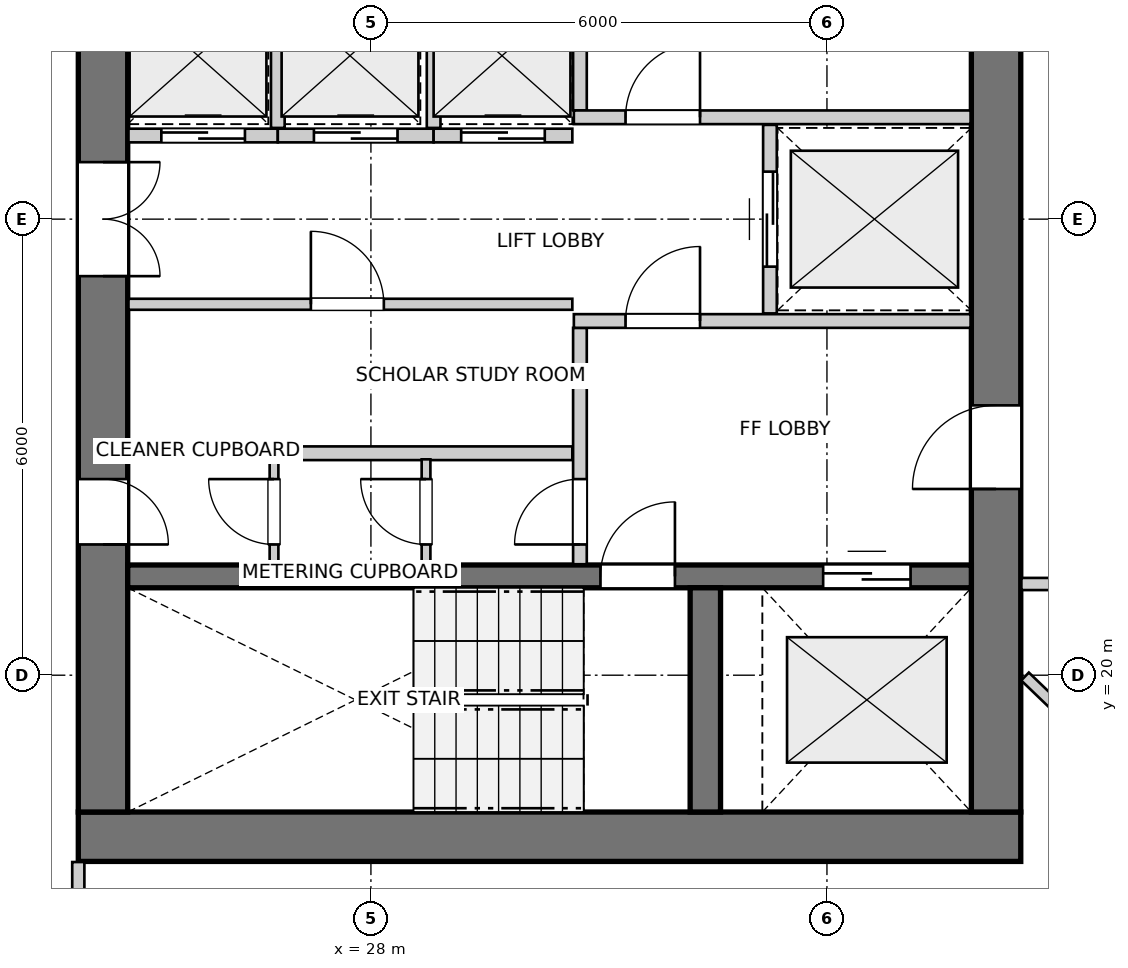
"""IFC4 building model, lengths in metres.
Left out: names, types, materials, properties, quantities, classifications, styles, units other than length and angle.
Written with IfcOpenShell. Run it as: python <this file> out.ifc"""

import sys

from ifc_helpers import new_model, si_unit, direction, frame, frame_2d, origin, place, context, subcontext, project, spatial, rectangle, extrude, source, transform, mapped, element, fill, save


model = new_model("IFC4")
c1 = context("Model", 3, precision=1e-05, world=origin(), true_north=direction((0.0, 1.0)))
c2 = subcontext(c1, "Body", "Model", "MODEL_VIEW")
j1 = project(units=[si_unit("LENGTHUNIT", "METRE"), si_unit("PLANEANGLEUNIT", "RADIAN")], contexts=[c1])
p1 = place(None, origin())
s1 = spatial("IfcSite", under=j1, at=p1, CompositionType="ELEMENT")
p2 = place(p1, origin())
s2 = spatial("IfcBuilding", under=s1, at=p2, CompositionType="ELEMENT")
p3 = place(p2, frame((0.0, 0.0, 155.4)))
s3 = spatial("IfcBuildingStorey", under=s2, at=p3, CompositionType="ELEMENT", Elevation=155.4)
p4 = place(p3, frame((24.15, 17.875, 0.0), z_axis=(0.0, 0.0, 1.0), x_axis=(1.0, 0.0, 0.0)))
e1 = element("IfcWall", 1, at=p4, inside=s3, PredefinedType="SHEAR", context=c2, shape_type="SweptSolid", body=[
    extrude(rectangle(XDim=12.4, YDim=0.65, at=frame_2d((6.2, 0.0))), origin(), (0.0, 0.0, 1.0), 2.935),
])
p5 = place(p3, frame((24.475, 33.8, 0.0), z_axis=(0.0, 0.0, 1.0), x_axis=(0.0, -1.0, 0.0)))
e2 = element("IfcWall", 2, at=p5, inside=s3, PredefinedType="SHEAR", context=c2, shape_type="SweptSolid", body=[
    extrude(rectangle(XDim=15.6, YDim=0.65, at=frame_2d((7.8, 0.0))), origin(), (0.0, 0.0, 1.0), 2.935),
])
p6 = place(p5, frame((7.05, 0.0, 0.0)))
e3 = element("IfcOpeningElement", 3, at=p6, cuts=e2, PredefinedType="OPENING", context=c2, shape_type="SweptSolid", body=[
    extrude(rectangle(XDim=1.5, YDim=2.15, at=frame_2d((0.75, 1.075))), frame((0.0, 0.335, 0.0), z_axis=(0.0, -1.0, 0.0), x_axis=(1.0, 0.0, 0.0)), (0.0, 0.0, 1.0), 0.67),
])
p7 = place(p5, frame((3.52, 0.0, 0.0)))
e4 = element("IfcOpeningElement", 4, at=p7, cuts=e2, PredefinedType="OPENING", context=c2, shape_type="SweptSolid", body=[
    extrude(rectangle(XDim=0.86, YDim=2.05, at=frame_2d((0.43, 1.025))), frame((0.0, 0.335, 0.0), z_axis=(0.0, -1.0, 0.0), x_axis=(1.0, 0.0, 0.0)), (0.0, 0.0, 1.0), 0.67),
])
p8 = place(p5, frame((11.22, 0.0, 0.0)))
e5 = element("IfcOpeningElement", 5, at=p8, cuts=e2, PredefinedType="OPENING", context=c2, shape_type="SweptSolid", body=[
    extrude(rectangle(XDim=0.86, YDim=2.05, at=frame_2d((0.43, 1.025))), frame((0.0, 0.335, 0.0), z_axis=(0.0, -1.0, 0.0), x_axis=(1.0, 0.0, 0.0)), (0.0, 0.0, 1.0), 0.67),
])
p9 = place(p3, frame((36.225, 18.2, 0.0), z_axis=(0.0, 0.0, 1.0), x_axis=(0.0, 1.0, 0.0)))
e6 = element("IfcWall", 6, at=p9, inside=s3, PredefinedType="SHEAR", context=c2, shape_type="SweptSolid", body=[
    extrude(rectangle(XDim=15.6, YDim=0.65, at=frame_2d((7.8, 0.0))), origin(), (0.0, 0.0, 1.0), 2.935),
])
p10 = place(p9, frame((4.25, 0.0, 0.0)))
e7 = element("IfcOpeningElement", 7, at=p10, cuts=e6, PredefinedType="OPENING", context=c2, shape_type="SweptSolid", body=[
    extrude(rectangle(XDim=1.1, YDim=2.15, at=frame_2d((0.55, 1.075))), frame((0.0, 0.335, 0.0), z_axis=(0.0, -1.0, 0.0), x_axis=(1.0, 0.0, 0.0)), (0.0, 0.0, 1.0), 0.67),
])
p11 = place(p9, frame((10.25, 0.0, 0.0)))
e8 = element("IfcOpeningElement", 8, at=p11, cuts=e6, PredefinedType="OPENING", context=c2, shape_type="SweptSolid", body=[
    extrude(rectangle(XDim=1.1, YDim=2.15, at=frame_2d((0.55, 1.075))), frame((0.0, 0.335, 0.0), z_axis=(0.0, -1.0, 0.0), x_axis=(1.0, 0.0, 0.0)), (0.0, 0.0, 1.0), 0.67),
])
p12 = place(p3, frame((24.8, 21.3, 0.0), z_axis=(0.0, 0.0, 1.0), x_axis=(1.0, 0.0, 0.0)))
e9 = element("IfcWall", 9, at=p12, inside=s3, PredefinedType="SHEAR", context=c2, shape_type="SweptSolid", body=[
    extrude(rectangle(XDim=11.1, YDim=0.3, at=frame_2d((5.55, 0.0))), origin(), (0.0, 0.0, 1.0), 2.935),
])
p13 = place(p12, frame((6.22, 0.0, 0.0)))
e10 = element("IfcOpeningElement", 10, at=p13, cuts=e9, PredefinedType="OPENING", context=c2, shape_type="SweptSolid", body=[
    extrude(rectangle(XDim=0.98, YDim=2.15, at=frame_2d((0.49, 1.075))), frame((0.0, 0.16, 0.0), z_axis=(0.0, -1.0, 0.0), x_axis=(1.0, 0.0, 0.0)), (0.0, 0.0, 1.0), 0.32),
])
p14 = place(p12, frame((9.15, 0.0, 0.0)))
e11 = element("IfcOpeningElement", 11, at=p14, cuts=e9, PredefinedType="OPENING", context=c2, shape_type="SweptSolid", body=[
    extrude(rectangle(XDim=1.15, YDim=2.15, at=frame_2d((0.575, 1.075))), frame((0.0, 0.16, 0.0), z_axis=(0.0, -1.0, 0.0), x_axis=(1.0, 0.0, 0.0)), (0.0, 0.0, 1.0), 0.32),
])
p15 = place(p3, frame((32.4, 18.2, 0.0), z_axis=(0.0, 0.0, 1.0), x_axis=(0.0, 1.0, 0.0)))
e12 = element("IfcWall", 12, at=p15, inside=s3, PredefinedType="SHEAR", context=c2, shape_type="SweptSolid", body=[
    extrude(rectangle(XDim=2.95, YDim=0.4, at=frame_2d((1.475, 0.0))), origin(), (0.0, 0.0, 1.0), 2.935),
])
p16 = place(p3, frame((30.75, 21.46, 0.0), z_axis=(0.0, 0.0, 1.0), x_axis=(0.0, 1.0, 0.0)))
e13 = element("IfcWall", 13, at=p16, inside=s3, PredefinedType="PARTITIONING", context=c2, shape_type="SweptSolid", body=[
    extrude(rectangle(XDim=3.11, YDim=0.18, at=frame_2d((1.555, 0.0))), origin(), (0.0, 0.0, 1.0), 2.935),
])
p17 = place(p16, frame((0.26, 0.0, 0.0)))
e14 = element("IfcOpeningElement", 14, at=p17, cuts=e13, PredefinedType="OPENING", context=c2, shape_type="SweptSolid", body=[
    extrude(rectangle(XDim=0.86, YDim=2.05, at=frame_2d((0.43, 1.025))), frame((0.0, 0.1, 0.0), z_axis=(0.0, -1.0, 0.0), x_axis=(1.0, 0.0, 0.0)), (0.0, 0.0, 1.0), 0.2),
])
p18 = place(p3, frame((30.67, 24.66, 0.0), z_axis=(0.0, 0.0, 1.0), x_axis=(1.0, 0.0, 0.0)))
e15 = element("IfcWall", 15, at=p18, inside=s3, PredefinedType="PARTITIONING", context=c2, shape_type="SweptSolid", body=[
    extrude(rectangle(XDim=5.22, YDim=0.18, at=frame_2d((2.61, 0.0))), origin(), (0.0, 0.0, 1.0), 2.935),
])
p19 = place(p18, frame((0.68, 0.0, 0.0)))
e16 = element("IfcOpeningElement", 16, at=p19, cuts=e15, PredefinedType="OPENING", context=c2, shape_type="SweptSolid", body=[
    extrude(rectangle(XDim=0.98, YDim=2.15, at=frame_2d((0.49, 1.075))), frame((0.0, 0.1, 0.0), z_axis=(0.0, -1.0, 0.0), x_axis=(1.0, 0.0, 0.0)), (0.0, 0.0, 1.0), 0.2),
])
p20 = place(p3, frame((30.75, 27.43, 0.0), z_axis=(0.0, 0.0, 1.0), x_axis=(0.0, 1.0, 0.0)))
e17 = element("IfcWall", 17, at=p20, inside=s3, PredefinedType="PARTITIONING", context=c2, shape_type="SweptSolid", body=[
    extrude(rectangle(XDim=3.11, YDim=0.18, at=frame_2d((1.555, 0.0))), origin(), (0.0, 0.0, 1.0), 2.935),
])
p21 = place(p20, frame((1.98, 0.0, 0.0)))
e18 = element("IfcOpeningElement", 18, at=p21, cuts=e17, PredefinedType="OPENING", context=c2, shape_type="SweptSolid", body=[
    extrude(rectangle(XDim=0.86, YDim=2.05, at=frame_2d((0.43, 1.025))), frame((0.0, 0.1, 0.0), z_axis=(0.0, -1.0, 0.0), x_axis=(1.0, 0.0, 0.0)), (0.0, 0.0, 1.0), 0.2),
])
p22 = place(p3, frame((30.67, 27.34, 0.0), z_axis=(0.0, 0.0, 1.0), x_axis=(1.0, 0.0, 0.0)))
e19 = element("IfcWall", 19, at=p22, inside=s3, PredefinedType="PARTITIONING", context=c2, shape_type="SweptSolid", body=[
    extrude(rectangle(XDim=5.22, YDim=0.18, at=frame_2d((2.61, 0.0))), origin(), (0.0, 0.0, 1.0), 2.935),
])
p23 = place(p22, frame((0.68, 0.0, 0.0)))
e20 = element("IfcOpeningElement", 20, at=p23, cuts=e19, PredefinedType="OPENING", context=c2, shape_type="SweptSolid", body=[
    extrude(rectangle(XDim=0.98, YDim=2.15, at=frame_2d((0.49, 1.075))), frame((0.0, 0.1, 0.0), z_axis=(0.0, -1.0, 0.0), x_axis=(1.0, 0.0, 0.0)), (0.0, 0.0, 1.0), 0.2),
])
p24 = place(p3, frame((33.25, 24.76, 0.0), z_axis=(0.0, 0.0, 1.0), x_axis=(0.0, 1.0, 0.0)))
e21 = element("IfcWall", 21, at=p24, inside=s3, PredefinedType="PARTITIONING", context=c2, shape_type="SweptSolid", body=[
    extrude(rectangle(XDim=2.48, YDim=0.18, at=frame_2d((1.24, 0.0))), origin(), (0.0, 0.0, 1.0), 2.935),
])
p25 = place(p24, frame((0.615, 0.0, 0.0)))
e22 = element("IfcOpeningElement", 22, at=p25, cuts=e21, PredefinedType="OPENING", context=c2, shape_type="SweptSolid", body=[
    extrude(rectangle(XDim=1.25, YDim=2.15, at=frame_2d((0.625, 1.075))), frame((0.0, 0.1, 0.0), z_axis=(0.0, -1.0, 0.0), x_axis=(1.0, 0.0, 0.0)), (0.0, 0.0, 1.0), 0.2),
])
p26 = place(p3, frame((24.81, 22.92, 0.0), z_axis=(0.0, 0.0, 1.0), x_axis=(1.0, 0.0, 0.0)))
e23 = element("IfcWall", 23, at=p26, inside=s3, PredefinedType="PARTITIONING", context=c2, shape_type="SweptSolid", body=[
    extrude(rectangle(XDim=5.84, YDim=0.18, at=frame_2d((2.92, 0.0))), origin(), (0.0, 0.0, 1.0), 2.935),
])
p27 = place(p3, frame((24.81, 24.88, 0.0), z_axis=(0.0, 0.0, 1.0), x_axis=(1.0, 0.0, 0.0)))
e24 = element("IfcWall", 24, at=p27, inside=s3, PredefinedType="PARTITIONING", context=c2, shape_type="SweptSolid", body=[
    extrude(rectangle(XDim=5.84, YDim=0.145, at=frame_2d((2.92, 0.0))), origin(), (0.0, 0.0, 1.0), 2.935),
])
p28 = place(p27, frame((2.4, 0.0, 0.0)))
e25 = element("IfcOpeningElement", 25, at=p28, cuts=e24, PredefinedType="OPENING", context=c2, shape_type="SweptSolid", body=[
    extrude(rectangle(XDim=0.96, YDim=2.1, at=frame_2d((0.48, 1.05))), frame((0.0, 0.083, 0.0), z_axis=(0.0, -1.0, 0.0), x_axis=(1.0, 0.0, 0.0)), (0.0, 0.0, 1.0), 0.165),
])
p29 = place(p3, frame((24.81, 27.1, 0.0), z_axis=(0.0, 0.0, 1.0), x_axis=(1.0, 0.0, 0.0)))
e26 = element("IfcWall", 26, at=p29, inside=s3, PredefinedType="PARTITIONING", context=c2, shape_type="SweptSolid", body=[
    extrude(rectangle(XDim=1.965, YDim=0.18, at=frame_2d((0.982, 0.0))), origin(), (0.0, 0.0, 1.0), 2.935),
])
p30 = place(p29, frame((0.433, 0.0, 0.0)))
e27 = element("IfcOpeningElement", 27, at=p30, cuts=e26, PredefinedType="OPENING", context=c2, shape_type="SweptSolid", body=[
    extrude(rectangle(XDim=1.1, YDim=2.15, at=frame_2d((0.55, 1.075))), frame((0.0, 0.1, 0.0), z_axis=(0.0, -1.0, 0.0), x_axis=(1.0, 0.0, 0.0)), (0.0, 0.0, 1.0), 0.2),
])
p31 = place(p3, frame((26.775, 27.1, 0.0), z_axis=(0.0, 0.0, 1.0), x_axis=(1.0, 0.0, 0.0)))
e28 = element("IfcWall", 28, at=p31, inside=s3, PredefinedType="PARTITIONING", context=c2, shape_type="SweptSolid", body=[
    extrude(rectangle(XDim=2.05, YDim=0.18, at=frame_2d((1.025, 0.0))), origin(), (0.0, 0.0, 1.0), 2.935),
])
p32 = place(p31, frame((0.475, 0.0, 0.0)))
e29 = element("IfcOpeningElement", 29, at=p32, cuts=e28, PredefinedType="OPENING", context=c2, shape_type="SweptSolid", body=[
    extrude(rectangle(XDim=1.1, YDim=2.15, at=frame_2d((0.55, 1.075))), frame((0.0, 0.1, 0.0), z_axis=(0.0, -1.0, 0.0), x_axis=(1.0, 0.0, 0.0)), (0.0, 0.0, 1.0), 0.2),
])
p33 = place(p3, frame((26.775, 27.2, 0.0), z_axis=(0.0, 0.0, 1.0), x_axis=(0.0, 1.0, 0.0)))
e30 = element("IfcWall", 30, at=p33, inside=s3, PredefinedType="PARTITIONING", context=c2, shape_type="SweptSolid", body=[
    extrude(rectangle(XDim=1.78, YDim=0.18, at=frame_2d((0.89, 0.0))), origin(), (0.0, 0.0, 1.0), 2.935),
])
p34 = place(p3, frame((28.825, 27.1, 0.0), z_axis=(0.0, 0.0, 1.0), x_axis=(1.0, 0.0, 0.0)))
e31 = element("IfcWall", 31, at=p34, inside=s3, PredefinedType="PARTITIONING", context=c2, shape_type="SweptSolid", body=[
    extrude(rectangle(XDim=1.825, YDim=0.18, at=frame_2d((0.913, 0.0))), origin(), (0.0, 0.0, 1.0), 2.935),
])
p35 = place(p34, frame((0.363, 0.0, 0.0)))
e32 = element("IfcOpeningElement", 32, at=p35, cuts=e31, PredefinedType="OPENING", context=c2, shape_type="SweptSolid", body=[
    extrude(rectangle(XDim=1.1, YDim=2.15, at=frame_2d((0.55, 1.075))), frame((0.0, 0.1, 0.0), z_axis=(0.0, -1.0, 0.0), x_axis=(1.0, 0.0, 0.0)), (0.0, 0.0, 1.0), 0.2),
])
p36 = place(p3, frame((28.825, 27.2, 0.0), z_axis=(0.0, 0.0, 1.0), x_axis=(0.0, 1.0, 0.0)))
e33 = element("IfcWall", 33, at=p36, inside=s3, PredefinedType="PARTITIONING", context=c2, shape_type="SweptSolid", body=[
    extrude(rectangle(XDim=1.78, YDim=0.18, at=frame_2d((0.89, 0.0))), origin(), (0.0, 0.0, 1.0), 2.935),
])
p37 = place(p3, frame((26.725, 21.46, 0.0), z_axis=(0.0, 0.0, 1.0), x_axis=(0.0, 1.0, 0.0)))
e34 = element("IfcWall", 34, at=p37, inside=s3, PredefinedType="PARTITIONING", context=c2, shape_type="SweptSolid", body=[
    extrude(rectangle(XDim=1.38, YDim=0.115, at=frame_2d((0.69, 0.0))), origin(), (0.0, 0.0, 1.0), 2.935),
])
p38 = place(p37, frame((0.26, 0.0, 0.0)))
e35 = element("IfcOpeningElement", 35, at=p38, cuts=e34, PredefinedType="OPENING", context=c2, shape_type="SweptSolid", body=[
    extrude(rectangle(XDim=0.86, YDim=2.05, at=frame_2d((0.43, 1.025))), frame((0.0, 0.067, 0.0), z_axis=(0.0, -1.0, 0.0), x_axis=(1.0, 0.0, 0.0)), (0.0, 0.0, 1.0), 0.135),
])
p39 = place(p3, frame((28.725, 21.46, 0.0), z_axis=(0.0, 0.0, 1.0), x_axis=(0.0, 1.0, 0.0)))
e36 = element("IfcWall", 36, at=p39, inside=s3, PredefinedType="PARTITIONING", context=c2, shape_type="SweptSolid", body=[
    extrude(rectangle(XDim=1.38, YDim=0.115, at=frame_2d((0.69, 0.0))), origin(), (0.0, 0.0, 1.0), 2.935),
])
p40 = place(p39, frame((0.26, 0.0, 0.0)))
e37 = element("IfcOpeningElement", 37, at=p40, cuts=e36, PredefinedType="OPENING", context=c2, shape_type="SweptSolid", body=[
    extrude(rectangle(XDim=0.86, YDim=2.05, at=frame_2d((0.43, 1.025))), frame((0.0, 0.067, 0.0), z_axis=(0.0, -1.0, 0.0), x_axis=(1.0, 0.0, 0.0)), (0.0, 0.0, 1.0), 0.135),
])
p41 = place(p3, frame((24.15, 17.542, 0.0), z_axis=(0.0, 0.0, 1.0), x_axis=(0.0, -1.0, 0.0)))
e38 = element("IfcWall", 38, at=p41, inside=s3, PredefinedType="PARTITIONING", context=c2, shape_type="SweptSolid", body=[
    extrude(rectangle(XDim=3.945, YDim=0.16, at=frame_2d((1.973, 0.0))), origin(), (0.0, 0.0, 1.0), 2.935),
])
p42 = place(p41, frame((1.319, 0.0, 0.0)))
e39 = element("IfcOpeningElement", 39, at=p42, cuts=e38, PredefinedType="OPENING", context=c2, shape_type="SweptSolid", body=[
    extrude(rectangle(XDim=1.3, YDim=2.1, at=frame_2d((0.65, 1.05))), frame((0.0, 0.09, 0.0), z_axis=(0.0, -1.0, 0.0), x_axis=(1.0, 0.0, 0.0)), (0.0, 0.0, 1.0), 0.18),
])
p43 = place(p3, frame((36.606, 19.983, 0.0), z_axis=(0.0, 0.0, 1.0), x_axis=(0.720776649136, -0.69316738387, 0.0)))
e40 = element("IfcWall", 40, at=p43, inside=s3, PredefinedType="PARTITIONING", context=c2, shape_type="SweptSolid", body=[
    extrude(rectangle(XDim=7.401, YDim=0.145, at=frame_2d((3.701, 0.0))), origin(), (0.0, 0.0, 1.0), 2.935),
])
p44 = place(p3, frame((36.558, 21.2, 0.0), z_axis=(0.0, 0.0, 1.0), x_axis=(1.0, 0.0, 0.0)))
e41 = element("IfcWall", 41, at=p44, inside=s3, PredefinedType="PARTITIONING", context=c2, shape_type="SweptSolid", body=[
    extrude(rectangle(XDim=1.684, YDim=0.16, at=frame_2d((0.842, 0.0))), origin(), (0.0, 0.0, 1.0), 2.935),
])
m1 = source(origin(), c2, "Body", "SweptSolid", [
    extrude(rectangle(XDim=0.98, YDim=2.15, at=frame_2d((0.49, 1.075))), frame((0.0, 0.025, 0.0), z_axis=(0.0, -1.0, 0.0), x_axis=(1.0, 0.0, 0.0)), (0.0, 0.0, 1.0), 0.05),
])
p45 = place(p13, origin())
e42 = element("IfcDoor", 42, at=p45, inside=s3, OperationType="SINGLE_SWING_RIGHT", PredefinedType="DOOR", context=c2, shape_type="MappedRepresentation", body=[
    mapped(m1, transform((0.0, 0.0, 0.0), x_axis=(1.0, 0.0, 0.0), y_axis=(0.0, 1.0, 0.0), z_axis=(0.0, 0.0, 1.0), scale=1.0)),
])
fill(e10, e42)
m2 = source(origin(), c2, "Body", "SweptSolid", [
    extrude(rectangle(XDim=1.15, YDim=2.15, at=frame_2d((0.575, 1.075))), frame((0.0, 0.025, 0.0), z_axis=(0.0, -1.0, 0.0), x_axis=(1.0, 0.0, 0.0)), (0.0, 0.0, 1.0), 0.05),
])
p46 = place(p14, origin())
e43 = element("IfcDoor", 43, at=p46, inside=s3, OperationType="DOUBLE_DOOR_SLIDING", PredefinedType="DOOR", context=c2, shape_type="MappedRepresentation", body=[
    mapped(m2, transform((0.0, 0.0, 0.0), x_axis=(1.0, 0.0, 0.0), y_axis=(0.0, 1.0, 0.0), z_axis=(0.0, 0.0, 1.0), scale=1.0)),
])
fill(e11, e43)
m3 = source(origin(), c2, "Body", "SweptSolid", [
    extrude(rectangle(XDim=1.1, YDim=2.15, at=frame_2d((0.55, 1.075))), frame((0.0, 0.025, 0.0), z_axis=(0.0, -1.0, 0.0), x_axis=(1.0, 0.0, 0.0)), (0.0, 0.0, 1.0), 0.05),
])
p47 = place(p10, origin())
e44 = element("IfcDoor", 44, at=p47, inside=s3, OperationType="SINGLE_SWING_LEFT", PredefinedType="DOOR", context=c2, shape_type="MappedRepresentation", body=[
    mapped(m3, transform((0.0, 0.0, 0.0), x_axis=(1.0, 0.0, 0.0), y_axis=(0.0, 1.0, 0.0), z_axis=(0.0, 0.0, 1.0), scale=1.0)),
])
fill(e7, e44)
m4 = source(origin(), c2, "Body", "SweptSolid", [
    extrude(rectangle(XDim=1.5, YDim=2.15, at=frame_2d((0.75, 1.075))), frame((0.0, 0.025, 0.0), z_axis=(0.0, -1.0, 0.0), x_axis=(1.0, 0.0, 0.0)), (0.0, 0.0, 1.0), 0.05),
])
p48 = place(p6, origin())
e45 = element("IfcDoor", 45, at=p48, inside=s3, OperationType="DOUBLE_DOOR_SINGLE_SWING", PredefinedType="DOOR", context=c2, shape_type="MappedRepresentation", body=[
    mapped(m4, transform((0.0, 0.0, 0.0), x_axis=(1.0, 0.0, 0.0), y_axis=(0.0, 1.0, 0.0), z_axis=(0.0, 0.0, 1.0), scale=1.0)),
])
fill(e3, e45)
m5 = source(origin(), c2, "Body", "SweptSolid", [
    extrude(rectangle(XDim=0.86, YDim=2.05, at=frame_2d((0.43, 1.025))), frame((0.0, 0.025, 0.0), z_axis=(0.0, -1.0, 0.0), x_axis=(1.0, 0.0, 0.0)), (0.0, 0.0, 1.0), 0.05),
])
p49 = place(p8, origin())
e46 = element("IfcDoor", 46, at=p49, inside=s3, OperationType="SINGLE_SWING_RIGHT", PredefinedType="DOOR", context=c2, shape_type="MappedRepresentation", body=[
    mapped(m5, transform((0.0, 0.0, 0.0), x_axis=(1.0, 0.0, 0.0), y_axis=(0.0, 1.0, 0.0), z_axis=(0.0, 0.0, 1.0), scale=1.0)),
])
fill(e5, e46)
p50 = place(p17, origin())
e47 = element("IfcDoor", 47, at=p50, inside=s3, OperationType="SINGLE_SWING_LEFT", PredefinedType="DOOR", context=c2, shape_type="MappedRepresentation", body=[
    mapped(m5, transform((0.0, 0.0, 0.0), x_axis=(1.0, 0.0, 0.0), y_axis=(0.0, 1.0, 0.0), z_axis=(0.0, 0.0, 1.0), scale=1.0)),
])
fill(e14, e47)
p51 = place(p19, origin())
e48 = element("IfcDoor", 48, at=p51, inside=s3, OperationType="SINGLE_SWING_RIGHT", PredefinedType="DOOR", context=c2, shape_type="MappedRepresentation", body=[
    mapped(m1, transform((0.0, 0.0, 0.0), x_axis=(1.0, 0.0, 0.0), y_axis=(0.0, 1.0, 0.0), z_axis=(0.0, 0.0, 1.0), scale=1.0)),
])
fill(e16, e48)
p52 = place(p23, origin())
e49 = element("IfcDoor", 49, at=p52, inside=s3, OperationType="SINGLE_SWING_RIGHT", PredefinedType="DOOR", context=c2, shape_type="MappedRepresentation", body=[
    mapped(m1, transform((0.0, 0.0, 0.0), x_axis=(1.0, 0.0, 0.0), y_axis=(0.0, 1.0, 0.0), z_axis=(0.0, 0.0, 1.0), scale=1.0)),
])
fill(e20, e49)
m6 = source(origin(), c2, "Body", "SweptSolid", [
    extrude(rectangle(XDim=1.25, YDim=2.15, at=frame_2d((0.625, 1.075))), frame((0.0, 0.025, 0.0), z_axis=(0.0, -1.0, 0.0), x_axis=(1.0, 0.0, 0.0)), (0.0, 0.0, 1.0), 0.05),
])
p53 = place(p25, origin())
e50 = element("IfcDoor", 50, at=p53, inside=s3, OperationType="DOUBLE_DOOR_SLIDING", PredefinedType="DOOR", context=c2, shape_type="MappedRepresentation", body=[
    mapped(m6, transform((0.0, 0.0, 0.0), x_axis=(1.0, 0.0, 0.0), y_axis=(0.0, 1.0, 0.0), z_axis=(0.0, 0.0, 1.0), scale=1.0)),
])
fill(e22, e50)
m7 = source(origin(), c2, "Body", "SweptSolid", [
    extrude(rectangle(XDim=0.96, YDim=2.1, at=frame_2d((0.48, 1.05))), frame((0.0, 0.025, 0.0), z_axis=(0.0, -1.0, 0.0), x_axis=(1.0, 0.0, 0.0)), (0.0, 0.0, 1.0), 0.05),
])
p54 = place(p28, origin())
e51 = element("IfcDoor", 51, at=p54, inside=s3, OperationType="SINGLE_SWING_LEFT", PredefinedType="DOOR", context=c2, shape_type="MappedRepresentation", body=[
    mapped(m7, transform((0.0, 0.0, 0.0), x_axis=(1.0, 0.0, 0.0), y_axis=(0.0, 1.0, 0.0), z_axis=(0.0, 0.0, 1.0), scale=1.0)),
])
fill(e25, e51)
p55 = place(p30, origin())
e52 = element("IfcDoor", 52, at=p55, inside=s3, OperationType="DOUBLE_DOOR_SLIDING", PredefinedType="DOOR", context=c2, shape_type="MappedRepresentation", body=[
    mapped(m3, transform((0.0, 0.0, 0.0), x_axis=(1.0, 0.0, 0.0), y_axis=(0.0, 1.0, 0.0), z_axis=(0.0, 0.0, 1.0), scale=1.0)),
])
fill(e27, e52)
p56 = place(p32, origin())
e53 = element("IfcDoor", 53, at=p56, inside=s3, OperationType="DOUBLE_DOOR_SLIDING", PredefinedType="DOOR", context=c2, shape_type="MappedRepresentation", body=[
    mapped(m3, transform((0.0, 0.0, 0.0), x_axis=(1.0, 0.0, 0.0), y_axis=(0.0, 1.0, 0.0), z_axis=(0.0, 0.0, 1.0), scale=1.0)),
])
fill(e29, e53)
p57 = place(p35, origin())
e54 = element("IfcDoor", 54, at=p57, inside=s3, OperationType="DOUBLE_DOOR_SLIDING", PredefinedType="DOOR", context=c2, shape_type="MappedRepresentation", body=[
    mapped(m3, transform((0.0, 0.0, 0.0), x_axis=(1.0, 0.0, 0.0), y_axis=(0.0, 1.0, 0.0), z_axis=(0.0, 0.0, 1.0), scale=1.0)),
])
fill(e32, e54)
p58 = place(p38, origin())
e55 = element("IfcDoor", 55, at=p58, inside=s3, OperationType="SINGLE_SWING_RIGHT", PredefinedType="DOOR", context=c2, shape_type="MappedRepresentation", body=[
    mapped(m5, transform((0.0, 0.0, 0.0), x_axis=(1.0, 0.0, 0.0), y_axis=(0.0, 1.0, 0.0), z_axis=(0.0, 0.0, 1.0), scale=1.0)),
])
fill(e35, e55)
p59 = place(p40, origin())
e56 = element("IfcDoor", 56, at=p59, inside=s3, OperationType="SINGLE_SWING_RIGHT", PredefinedType="DOOR", context=c2, shape_type="MappedRepresentation", body=[
    mapped(m5, transform((0.0, 0.0, 0.0), x_axis=(1.0, 0.0, 0.0), y_axis=(0.0, 1.0, 0.0), z_axis=(0.0, 0.0, 1.0), scale=1.0)),
])
fill(e37, e56)
save(model, sys.argv[1])
